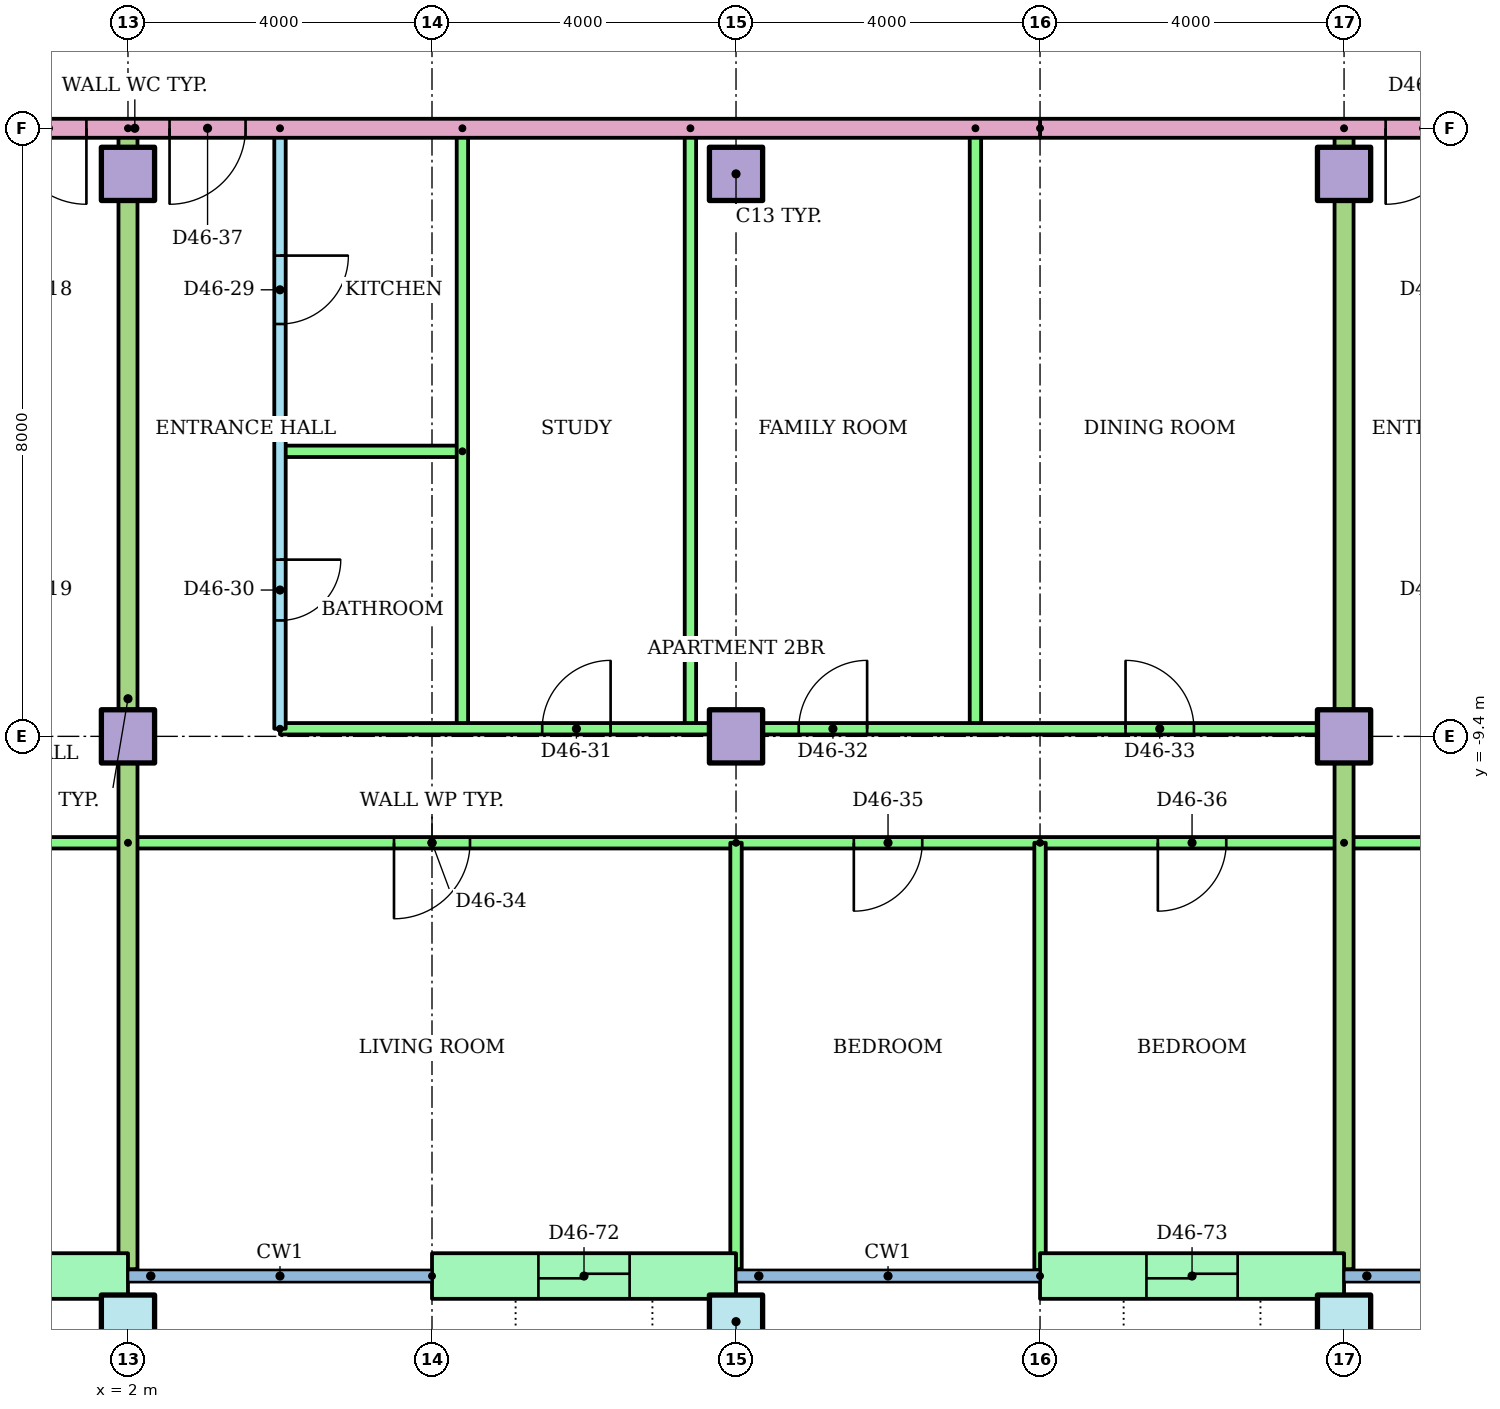
"""IFC4 building model, lengths in metres.
Left out: names, types, materials, properties, quantities, classifications, styles, units other than length and angle.
Written with IfcOpenShell. Run it as: python <this file> out.ifc"""

import sys

from ifc_helpers import new_model, si_unit, direction, frame, frame_2d, origin, origin_2d, place, context, subcontext, project, spatial, rectangle, hollow_rectangle, extrude, element, fill, save


model = new_model("IFC4")
c1 = context("Model", 3, precision=1e-05, world=origin(), true_north=direction((0.0, 1.0)))
c2 = subcontext(c1, "Body", "Model", "MODEL_VIEW")
j1 = project(units=[si_unit("LENGTHUNIT", "METRE"), si_unit("PLANEANGLEUNIT", "RADIAN")], contexts=[c1])
p1 = place(None, origin())
s1 = spatial("IfcSite", under=j1, at=p1, CompositionType="ELEMENT")
p2 = place(p1, origin())
s2 = spatial("IfcBuilding", under=s1, at=p2, CompositionType="ELEMENT")
p3 = place(p2, frame((0.0, 0.0, 178.1)))
s3 = spatial("IfcBuildingStorey", under=s2, at=p3, CompositionType="ELEMENT", Elevation=178.1)
for number, where in (
    (1, (2.0, -17.1, 0.0)),
    (2, (10.0, -17.1, 0.0)),
    (3, (18.0, -17.1, 0.0)),
):
    element("IfcColumn", number, at=place(p3, frame(where)), inside=s3, PredefinedType="COLUMN", context=c2, shape_type="SweptSolid", body=[
        extrude(hollow_rectangle(XDim=0.7, YDim=0.7, WallThickness=0.036, at=origin_2d()), origin(), (0.0, 0.0, 1.0), 3.2),
    ])
for number, where in (
    (4, (2.0, -9.4, 0.0)),
    (5, (10.0, -9.4, 0.0)),
    (6, (18.0, -9.4, 0.0)),
    (7, (2.0, -2.0, 0.0)),
    (8, (10.0, -2.0, 0.0)),
    (9, (18.0, -2.0, 0.0)),
):
    element("IfcColumn", number, at=place(p3, frame(where)), inside=s3, PredefinedType="COLUMN", context=c2, shape_type="SweptSolid", body=[
        extrude(rectangle(XDim=0.7, YDim=0.7, at=origin_2d()), origin(), (0.0, 0.0, 1.0), 3.2),
    ])
p4 = place(p3, frame((-2.0, -16.5, 0.0)))
e10 = element("IfcWall", 10, at=p4, inside=s3, PredefinedType="STANDARD", context=c2, shape_type="SweptSolid", body=[
    extrude(rectangle(XDim=4.0, YDim=0.6, at=frame_2d((2.0, 0.0))), origin(), (0.0, 0.0, 1.0), 2.92),
])
p5 = place(p4, frame((1.4, 0.0, 0.0)))
e11 = element("IfcOpeningElement", 11, at=p5, cuts=e10, PredefinedType="OPENING", context=c2, shape_type="SweptSolid", body=[
    extrude(rectangle(XDim=1.2, YDim=2.1, at=frame_2d((0.6, 1.05))), frame((0.0, 0.31, 0.0), z_axis=(0.0, -1.0, 0.0), x_axis=(1.0, 0.0, 0.0)), (0.0, 0.0, 1.0), 0.62),
])
p6 = place(p3, frame((6.0, -16.5, 0.0)))
e12 = element("IfcWall", 12, at=p6, inside=s3, PredefinedType="STANDARD", context=c2, shape_type="SweptSolid", body=[
    extrude(rectangle(XDim=4.0, YDim=0.6, at=frame_2d((2.0, 0.0))), origin(), (0.0, 0.0, 1.0), 2.92),
])
p7 = place(p6, frame((1.4, 0.0, 0.0)))
e13 = element("IfcOpeningElement", 13, at=p7, cuts=e12, PredefinedType="OPENING", context=c2, shape_type="SweptSolid", body=[
    extrude(rectangle(XDim=1.2, YDim=2.1, at=frame_2d((0.6, 1.05))), frame((0.0, 0.31, 0.0), z_axis=(0.0, -1.0, 0.0), x_axis=(1.0, 0.0, 0.0)), (0.0, 0.0, 1.0), 0.62),
])
p8 = place(p3, frame((14.0, -16.5, 0.0)))
e14 = element("IfcWall", 14, at=p8, inside=s3, PredefinedType="STANDARD", context=c2, shape_type="SweptSolid", body=[
    extrude(rectangle(XDim=4.0, YDim=0.6, at=frame_2d((2.0, 0.0))), origin(), (0.0, 0.0, 1.0), 2.92),
])
p9 = place(p8, frame((1.4, 0.0, 0.0)))
e15 = element("IfcOpeningElement", 15, at=p9, cuts=e14, PredefinedType="OPENING", context=c2, shape_type="SweptSolid", body=[
    extrude(rectangle(XDim=1.2, YDim=2.1, at=frame_2d((0.6, 1.05))), frame((0.0, 0.31, 0.0), z_axis=(0.0, -1.0, 0.0), x_axis=(1.0, 0.0, 0.0)), (0.0, 0.0, 1.0), 0.62),
])
p10 = place(p3, frame((2.0, -10.8, 0.0), z_axis=(0.0, 0.0, 1.0), x_axis=(-1.0, 0.0, 0.0)))
e16 = element("IfcWall", 16, at=p10, inside=s3, PredefinedType="PARTITIONING", context=c2, shape_type="SweptSolid", body=[
    extrude(rectangle(XDim=26.82, YDim=0.15, at=frame_2d((13.41, 0.0))), origin(), (0.0, 0.0, 1.0), 2.4),
])
p11 = place(p10, frame((24.547, 0.0, 0.0)))
e17 = element("IfcOpeningElement", 17, at=p11, cuts=e16, PredefinedType="OPENING", context=c2, shape_type="SweptSolid", body=[
    extrude(rectangle(XDim=0.9, YDim=2.1, at=frame_2d((0.45, 1.05))), frame((0.0, 0.085, 0.0), z_axis=(0.0, -1.0, 0.0), x_axis=(1.0, 0.0, 0.0)), (0.0, 0.0, 1.0), 0.17),
])
p12 = place(p10, frame((18.6, 0.0, 0.0)))
e18 = element("IfcOpeningElement", 18, at=p12, cuts=e16, PredefinedType="OPENING", context=c2, shape_type="SweptSolid", body=[
    extrude(rectangle(XDim=0.9, YDim=2.1, at=frame_2d((0.45, 1.05))), frame((0.0, 0.085, 0.0), z_axis=(0.0, -1.0, 0.0), x_axis=(1.0, 0.0, 0.0)), (0.0, 0.0, 1.0), 0.17),
])
p13 = place(p10, frame((11.5, 0.0, 0.0)))
e19 = element("IfcOpeningElement", 19, at=p13, cuts=e16, PredefinedType="OPENING", context=c2, shape_type="SweptSolid", body=[
    extrude(rectangle(XDim=1.0, YDim=2.1, at=frame_2d((0.5, 1.05))), frame((0.0, 0.085, 0.0), z_axis=(0.0, -1.0, 0.0), x_axis=(1.0, 0.0, 0.0)), (0.0, 0.0, 1.0), 0.17),
])
p14 = place(p10, frame((5.55, 0.0, 0.0)))
e20 = element("IfcOpeningElement", 20, at=p14, cuts=e16, PredefinedType="OPENING", context=c2, shape_type="SweptSolid", body=[
    extrude(rectangle(XDim=0.9, YDim=2.1, at=frame_2d((0.45, 1.05))), frame((0.0, 0.085, 0.0), z_axis=(0.0, -1.0, 0.0), x_axis=(1.0, 0.0, 0.0)), (0.0, 0.0, 1.0), 0.17),
])
p15 = place(p10, frame((1.55, 0.0, 0.0)))
e21 = element("IfcOpeningElement", 21, at=p15, cuts=e16, PredefinedType="OPENING", context=c2, shape_type="SweptSolid", body=[
    extrude(rectangle(XDim=0.9, YDim=2.1, at=frame_2d((0.45, 1.05))), frame((0.0, 0.085, 0.0), z_axis=(0.0, -1.0, 0.0), x_axis=(1.0, 0.0, 0.0)), (0.0, 0.0, 1.0), 0.17),
])
p16 = place(p3, frame((4.0, -1.4, 0.0), z_axis=(0.0, 0.0, 1.0), x_axis=(0.0, -1.0, 0.0)))
e22 = element("IfcWall", 22, at=p16, inside=s3, PredefinedType="PARTITIONING", context=c2, shape_type="SweptSolid", body=[
    extrude(rectangle(XDim=7.9, YDim=0.15, at=frame_2d((3.95, 0.0))), origin(), (0.0, 0.0, 1.0), 2.4),
])
p17 = place(p16, frame((1.675, 0.0, 0.0)))
e23 = element("IfcOpeningElement", 23, at=p17, cuts=e22, PredefinedType="OPENING", context=c2, shape_type="SweptSolid", body=[
    extrude(rectangle(XDim=0.9, YDim=2.1, at=frame_2d((0.45, 1.05))), frame((0.0, 0.085, 0.0), z_axis=(0.0, -1.0, 0.0), x_axis=(1.0, 0.0, 0.0)), (0.0, 0.0, 1.0), 0.17),
])
p18 = place(p16, frame((5.675, 0.0, 0.0)))
e24 = element("IfcOpeningElement", 24, at=p18, cuts=e22, PredefinedType="OPENING", context=c2, shape_type="SweptSolid", body=[
    extrude(rectangle(XDim=0.8, YDim=2.1, at=frame_2d((0.4, 1.05))), frame((0.0, 0.085, 0.0), z_axis=(0.0, -1.0, 0.0), x_axis=(1.0, 0.0, 0.0)), (0.0, 0.0, 1.0), 0.17),
])
p19 = place(p3, frame((6.4, -5.65, 0.0), z_axis=(0.0, 0.0, 1.0), x_axis=(-1.0, 0.0, 0.0)))
e25 = element("IfcWall", 25, at=p19, inside=s3, PredefinedType="PARTITIONING", context=c2, shape_type="SweptSolid", body=[
    extrude(rectangle(XDim=2.4, YDim=0.15, at=frame_2d((1.2, 0.0))), origin(), (0.0, 0.0, 1.0), 2.4),
])
for number, where, z_axis, x_axis in (
    (26, (6.4, -1.4, 0.0), (0.0, 0.0, 1.0), (0.0, -1.0, 0.0)),
    (27, (9.4, -1.4, 0.0), (0.0, 0.0, 1.0), (0.0, -1.0, 0.0)),
    (28, (13.15, -1.4, 0.0), (0.0, 0.0, 1.0), (0.0, -1.0, 0.0)),
):
    element("IfcWall", number, at=place(p3, frame(where, z_axis=z_axis, x_axis=x_axis)), inside=s3, PredefinedType="PARTITIONING", context=c2, shape_type="SweptSolid", body=[
        extrude(rectangle(XDim=7.9, YDim=0.15, at=frame_2d((3.95, 0.0))), origin(), (0.0, 0.0, 1.0), 2.4),
    ])
p20 = place(p3, frame((4.0, -9.3, 0.0)))
e29 = element("IfcWall", 29, at=p20, inside=s3, PredefinedType="PARTITIONING", context=c2, shape_type="SweptSolid", body=[
    extrude(rectangle(XDim=14.0, YDim=0.15, at=frame_2d((7.0, 0.0))), origin(), (0.0, 0.0, 1.0), 2.4),
])
p21 = place(p20, frame((3.45, 0.0, 0.0)))
e30 = element("IfcOpeningElement", 30, at=p21, cuts=e29, PredefinedType="OPENING", context=c2, shape_type="SweptSolid", body=[
    extrude(rectangle(XDim=0.9, YDim=2.1, at=frame_2d((0.45, 1.05))), frame((0.0, 0.085, 0.0), z_axis=(0.0, -1.0, 0.0), x_axis=(1.0, 0.0, 0.0)), (0.0, 0.0, 1.0), 0.17),
])
p22 = place(p20, frame((6.825, 0.0, 0.0)))
e31 = element("IfcOpeningElement", 31, at=p22, cuts=e29, PredefinedType="OPENING", context=c2, shape_type="SweptSolid", body=[
    extrude(rectangle(XDim=0.9, YDim=2.1, at=frame_2d((0.45, 1.05))), frame((0.0, 0.085, 0.0), z_axis=(0.0, -1.0, 0.0), x_axis=(1.0, 0.0, 0.0)), (0.0, 0.0, 1.0), 0.17),
])
p23 = place(p20, frame((11.125, 0.0, 0.0)))
e32 = element("IfcOpeningElement", 32, at=p23, cuts=e29, PredefinedType="OPENING", context=c2, shape_type="SweptSolid", body=[
    extrude(rectangle(XDim=0.9, YDim=2.1, at=frame_2d((0.45, 1.05))), frame((0.0, 0.085, 0.0), z_axis=(0.0, -1.0, 0.0), x_axis=(1.0, 0.0, 0.0)), (0.0, 0.0, 1.0), 0.17),
])
p24 = place(p3, frame((18.0, -10.8, 0.0), z_axis=(0.0, 0.0, 1.0), x_axis=(-1.0, 0.0, 0.0)))
e33 = element("IfcWall", 33, at=p24, inside=s3, PredefinedType="PARTITIONING", context=c2, shape_type="SweptSolid", body=[
    extrude(rectangle(XDim=16.0, YDim=0.15, at=frame_2d((8.0, 0.0))), origin(), (0.0, 0.0, 1.0), 2.4),
])
p25 = place(p24, frame((11.5, 0.0, 0.0)))
e34 = element("IfcOpeningElement", 34, at=p25, cuts=e33, PredefinedType="OPENING", context=c2, shape_type="SweptSolid", body=[
    extrude(rectangle(XDim=1.0, YDim=2.1, at=frame_2d((0.5, 1.05))), frame((0.0, 0.085, 0.0), z_axis=(0.0, -1.0, 0.0), x_axis=(1.0, 0.0, 0.0)), (0.0, 0.0, 1.0), 0.17),
])
p26 = place(p24, frame((5.55, 0.0, 0.0)))
e35 = element("IfcOpeningElement", 35, at=p26, cuts=e33, PredefinedType="OPENING", context=c2, shape_type="SweptSolid", body=[
    extrude(rectangle(XDim=0.9, YDim=2.1, at=frame_2d((0.45, 1.05))), frame((0.0, 0.085, 0.0), z_axis=(0.0, -1.0, 0.0), x_axis=(1.0, 0.0, 0.0)), (0.0, 0.0, 1.0), 0.17),
])
p27 = place(p24, frame((1.55, 0.0, 0.0)))
e36 = element("IfcOpeningElement", 36, at=p27, cuts=e33, PredefinedType="OPENING", context=c2, shape_type="SweptSolid", body=[
    extrude(rectangle(XDim=0.9, YDim=2.1, at=frame_2d((0.45, 1.05))), frame((0.0, 0.085, 0.0), z_axis=(0.0, -1.0, 0.0), x_axis=(1.0, 0.0, 0.0)), (0.0, 0.0, 1.0), 0.17),
])
p28 = place(p3, frame((10.0, -10.8, 0.0), z_axis=(0.0, 0.0, 1.0), x_axis=(0.0, -1.0, 0.0)))
e37 = element("IfcWall", 37, at=p28, inside=s3, PredefinedType="PARTITIONING", context=c2, shape_type="SweptSolid", body=[
    extrude(rectangle(XDim=5.61, YDim=0.15, at=frame_2d((2.805, 0.0))), origin(), (0.0, 0.0, 1.0), 2.4),
])
p29 = place(p3, frame((14.0, -10.8, 0.0), z_axis=(0.0, 0.0, 1.0), x_axis=(0.0, -1.0, 0.0)))
e38 = element("IfcWall", 38, at=p29, inside=s3, PredefinedType="PARTITIONING", context=c2, shape_type="SweptSolid", body=[
    extrude(rectangle(XDim=5.621, YDim=0.15, at=frame_2d((2.811, 0.0))), origin(), (0.0, 0.0, 1.0), 2.4),
])
p30 = place(p3, frame((2.0, -1.4, 0.0), z_axis=(0.0, 0.0, 1.0), x_axis=(0.0, -1.0, 0.0)))
e39 = element("IfcWall", 39, at=p30, inside=s3, PredefinedType="PARTITIONING", context=c2, shape_type="SweptSolid", body=[
    extrude(rectangle(XDim=15.01, YDim=0.25, at=frame_2d((7.505, 0.0))), origin(), (0.0, 0.0, 1.0), 2.4),
])
p31 = place(p3, frame((26.0, -10.8, 0.0), z_axis=(0.0, 0.0, 1.0), x_axis=(-1.0, 0.0, 0.0)))
e40 = element("IfcWall", 40, at=p31, inside=s3, PredefinedType="PARTITIONING", context=c2, shape_type="SweptSolid", body=[
    extrude(rectangle(XDim=8.0, YDim=0.15, at=frame_2d((4.0, 0.0))), origin(), (0.0, 0.0, 1.0), 2.4),
])
p32 = place(p31, frame((5.55, 0.0, 0.0)))
e41 = element("IfcOpeningElement", 41, at=p32, cuts=e40, PredefinedType="OPENING", context=c2, shape_type="SweptSolid", body=[
    extrude(rectangle(XDim=0.9, YDim=2.1, at=frame_2d((0.45, 1.05))), frame((0.0, 0.085, 0.0), z_axis=(0.0, -1.0, 0.0), x_axis=(1.0, 0.0, 0.0)), (0.0, 0.0, 1.0), 0.17),
])
p33 = place(p31, frame((1.5, 0.0, 0.0)))
e42 = element("IfcOpeningElement", 42, at=p33, cuts=e40, PredefinedType="OPENING", context=c2, shape_type="SweptSolid", body=[
    extrude(rectangle(XDim=1.0, YDim=2.1, at=frame_2d((0.5, 1.05))), frame((0.0, 0.085, 0.0), z_axis=(0.0, -1.0, 0.0), x_axis=(1.0, 0.0, 0.0)), (0.0, 0.0, 1.0), 0.17),
])
p34 = place(p3, frame((18.0, -1.4, 0.0), z_axis=(0.0, 0.0, 1.0), x_axis=(0.0, -1.0, 0.0)))
e43 = element("IfcWall", 43, at=p34, inside=s3, PredefinedType="PARTITIONING", context=c2, shape_type="SweptSolid", body=[
    extrude(rectangle(XDim=15.01, YDim=0.25, at=frame_2d((7.505, 0.0))), origin(), (0.0, 0.0, 1.0), 2.4),
])
p35 = place(p3, frame((29.0, -1.4, 0.0), z_axis=(0.0, 0.0, 1.0), x_axis=(-1.0, 0.0, 0.0)))
e44 = element("IfcWall", 44, at=p35, inside=s3, PredefinedType="PARTITIONING", context=c2, shape_type="SweptSolid", body=[
    extrude(rectangle(XDim=15.0, YDim=0.25, at=frame_2d((7.5, 0.0))), origin(), (0.0, 0.0, 1.0), 2.4),
])
p36 = place(p35, frame((9.453, 0.0, 0.0)))
e45 = element("IfcOpeningElement", 45, at=p36, cuts=e44, PredefinedType="OPENING", context=c2, shape_type="SweptSolid", body=[
    extrude(rectangle(XDim=1.0, YDim=2.1, at=frame_2d((0.5, 1.05))), frame((0.0, 0.135, 0.0), z_axis=(0.0, -1.0, 0.0), x_axis=(1.0, 0.0, 0.0)), (0.0, 0.0, 1.0), 0.27),
])
p37 = place(p35, frame((1.453, 0.0, 0.0)))
e46 = element("IfcOpeningElement", 46, at=p37, cuts=e44, PredefinedType="OPENING", context=c2, shape_type="SweptSolid", body=[
    extrude(rectangle(XDim=1.0, YDim=2.1, at=frame_2d((0.5, 1.05))), frame((0.0, 0.135, 0.0), z_axis=(0.0, -1.0, 0.0), x_axis=(1.0, 0.0, 0.0)), (0.0, 0.0, 1.0), 0.27),
])
p38 = place(p3, frame((14.0, -1.4, 0.0), z_axis=(0.0, 0.0, 1.0), x_axis=(-1.0, 0.0, 0.0)))
e47 = element("IfcWall", 47, at=p38, inside=s3, PredefinedType="PARTITIONING", context=c2, shape_type="SweptSolid", body=[
    extrude(rectangle(XDim=28.0, YDim=0.25, at=frame_2d((14.0, 0.0))), origin(), (0.0, 0.0, 1.0), 2.4),
])
p39 = place(p38, frame((12.547, 0.0, 0.0)))
e48 = element("IfcOpeningElement", 48, at=p39, cuts=e47, PredefinedType="OPENING", context=c2, shape_type="SweptSolid", body=[
    extrude(rectangle(XDim=1.0, YDim=2.1, at=frame_2d((0.5, 1.05))), frame((0.0, 0.135, 0.0), z_axis=(0.0, -1.0, 0.0), x_axis=(1.0, 0.0, 0.0)), (0.0, 0.0, 1.0), 0.27),
])
p40 = place(p38, frame((10.453, 0.0, 0.0)))
e49 = element("IfcOpeningElement", 49, at=p40, cuts=e47, PredefinedType="OPENING", context=c2, shape_type="SweptSolid", body=[
    extrude(rectangle(XDim=1.0, YDim=2.1, at=frame_2d((0.5, 1.05))), frame((0.0, 0.135, 0.0), z_axis=(0.0, -1.0, 0.0), x_axis=(1.0, 0.0, 0.0)), (0.0, 0.0, 1.0), 0.27),
])
p41 = place(p39, origin())
e50 = element("IfcDoor", 50, at=p41, inside=s3, OperationType="SINGLE_SWING_LEFT", PredefinedType="DOOR", context=c2, shape_type="SweptSolid", body=[
    extrude(rectangle(XDim=1.0, YDim=2.1, at=frame_2d((0.5, 1.05))), frame((0.0, 0.025, 0.0), z_axis=(0.0, -1.0, 0.0), x_axis=(1.0, 0.0, 0.0)), (0.0, 0.0, 1.0), 0.05),
])
fill(e48, e50)
p42 = place(p17, origin())
e51 = element("IfcDoor", 51, at=p42, inside=s3, OperationType="SINGLE_SWING_LEFT", PredefinedType="DOOR", context=c2, shape_type="SweptSolid", body=[
    extrude(rectangle(XDim=0.9, YDim=2.1, at=frame_2d((0.45, 1.05))), frame((0.0, 0.025, 0.0), z_axis=(0.0, -1.0, 0.0), x_axis=(1.0, 0.0, 0.0)), (0.0, 0.0, 1.0), 0.05),
])
fill(e23, e51)
p43 = place(p18, origin())
e52 = element("IfcDoor", 52, at=p43, inside=s3, OperationType="SINGLE_SWING_LEFT", PredefinedType="DOOR", context=c2, shape_type="SweptSolid", body=[
    extrude(rectangle(XDim=0.8, YDim=2.1, at=frame_2d((0.4, 1.05))), frame((0.0, 0.025, 0.0), z_axis=(0.0, -1.0, 0.0), x_axis=(1.0, 0.0, 0.0)), (0.0, 0.0, 1.0), 0.05),
])
fill(e24, e52)
p44 = place(p21, origin())
e53 = element("IfcDoor", 53, at=p44, inside=s3, OperationType="SINGLE_SWING_RIGHT", PredefinedType="DOOR", context=c2, shape_type="SweptSolid", body=[
    extrude(rectangle(XDim=0.9, YDim=2.1, at=frame_2d((0.45, 1.05))), frame((0.0, 0.025, 0.0), z_axis=(0.0, -1.0, 0.0), x_axis=(1.0, 0.0, 0.0)), (0.0, 0.0, 1.0), 0.05),
])
fill(e30, e53)
p45 = place(p22, origin())
e54 = element("IfcDoor", 54, at=p45, inside=s3, OperationType="SINGLE_SWING_RIGHT", PredefinedType="DOOR", context=c2, shape_type="SweptSolid", body=[
    extrude(rectangle(XDim=0.9, YDim=2.1, at=frame_2d((0.45, 1.05))), frame((0.0, 0.025, 0.0), z_axis=(0.0, -1.0, 0.0), x_axis=(1.0, 0.0, 0.0)), (0.0, 0.0, 1.0), 0.05),
])
fill(e31, e54)
p46 = place(p23, origin())
e55 = element("IfcDoor", 55, at=p46, inside=s3, OperationType="SINGLE_SWING_LEFT", PredefinedType="DOOR", context=c2, shape_type="SweptSolid", body=[
    extrude(rectangle(XDim=0.9, YDim=2.1, at=frame_2d((0.45, 1.05))), frame((0.0, 0.025, 0.0), z_axis=(0.0, -1.0, 0.0), x_axis=(1.0, 0.0, 0.0)), (0.0, 0.0, 1.0), 0.05),
])
fill(e32, e55)
p47 = place(p25, origin())
e56 = element("IfcDoor", 56, at=p47, inside=s3, OperationType="SINGLE_SWING_RIGHT", PredefinedType="DOOR", context=c2, shape_type="SweptSolid", body=[
    extrude(rectangle(XDim=1.0, YDim=2.1, at=frame_2d((0.5, 1.05))), frame((0.0, 0.025, 0.0), z_axis=(0.0, -1.0, 0.0), x_axis=(1.0, 0.0, 0.0)), (0.0, 0.0, 1.0), 0.05),
])
fill(e34, e56)
p48 = place(p26, origin())
e57 = element("IfcDoor", 57, at=p48, inside=s3, OperationType="SINGLE_SWING_RIGHT", PredefinedType="DOOR", context=c2, shape_type="SweptSolid", body=[
    extrude(rectangle(XDim=0.9, YDim=2.1, at=frame_2d((0.45, 1.05))), frame((0.0, 0.025, 0.0), z_axis=(0.0, -1.0, 0.0), x_axis=(1.0, 0.0, 0.0)), (0.0, 0.0, 1.0), 0.05),
])
fill(e35, e57)
p49 = place(p27, origin())
e58 = element("IfcDoor", 58, at=p49, inside=s3, OperationType="SINGLE_SWING_RIGHT", PredefinedType="DOOR", context=c2, shape_type="SweptSolid", body=[
    extrude(rectangle(XDim=0.9, YDim=2.1, at=frame_2d((0.45, 1.05))), frame((0.0, 0.025, 0.0), z_axis=(0.0, -1.0, 0.0), x_axis=(1.0, 0.0, 0.0)), (0.0, 0.0, 1.0), 0.05),
])
fill(e36, e58)
p50 = place(p40, origin())
e59 = element("IfcDoor", 59, at=p50, inside=s3, OperationType="SINGLE_SWING_RIGHT", PredefinedType="DOOR", context=c2, shape_type="SweptSolid", body=[
    extrude(rectangle(XDim=1.0, YDim=2.1, at=frame_2d((0.5, 1.05))), frame((0.0, 0.025, 0.0), z_axis=(0.0, -1.0, 0.0), x_axis=(1.0, 0.0, 0.0)), (0.0, 0.0, 1.0), 0.05),
])
fill(e49, e59)
p51 = place(p36, origin())
e60 = element("IfcDoor", 60, at=p51, inside=s3, OperationType="SINGLE_SWING_RIGHT", PredefinedType="DOOR", context=c2, shape_type="SweptSolid", body=[
    extrude(rectangle(XDim=1.0, YDim=2.1, at=frame_2d((0.5, 1.05))), frame((0.0, 0.025, 0.0), z_axis=(0.0, -1.0, 0.0), x_axis=(1.0, 0.0, 0.0)), (0.0, 0.0, 1.0), 0.05),
])
fill(e45, e60)
p52 = place(p7, origin())
e61 = element("IfcDoor", 61, at=p52, inside=s3, OperationType="SLIDING_TO_LEFT", PredefinedType="DOOR", context=c2, shape_type="SweptSolid", body=[
    extrude(rectangle(XDim=1.2, YDim=2.1, at=frame_2d((0.6, 1.05))), frame((0.0, 0.025, 0.0), z_axis=(0.0, -1.0, 0.0), x_axis=(1.0, 0.0, 0.0)), (0.0, 0.0, 1.0), 0.05),
])
fill(e13, e61)
p53 = place(p9, origin())
e62 = element("IfcDoor", 62, at=p53, inside=s3, OperationType="SLIDING_TO_LEFT", PredefinedType="DOOR", context=c2, shape_type="SweptSolid", body=[
    extrude(rectangle(XDim=1.2, YDim=2.1, at=frame_2d((0.6, 1.05))), frame((0.0, 0.025, 0.0), z_axis=(0.0, -1.0, 0.0), x_axis=(1.0, 0.0, 0.0)), (0.0, 0.0, 1.0), 0.05),
])
fill(e15, e62)
save(model, sys.argv[1])
